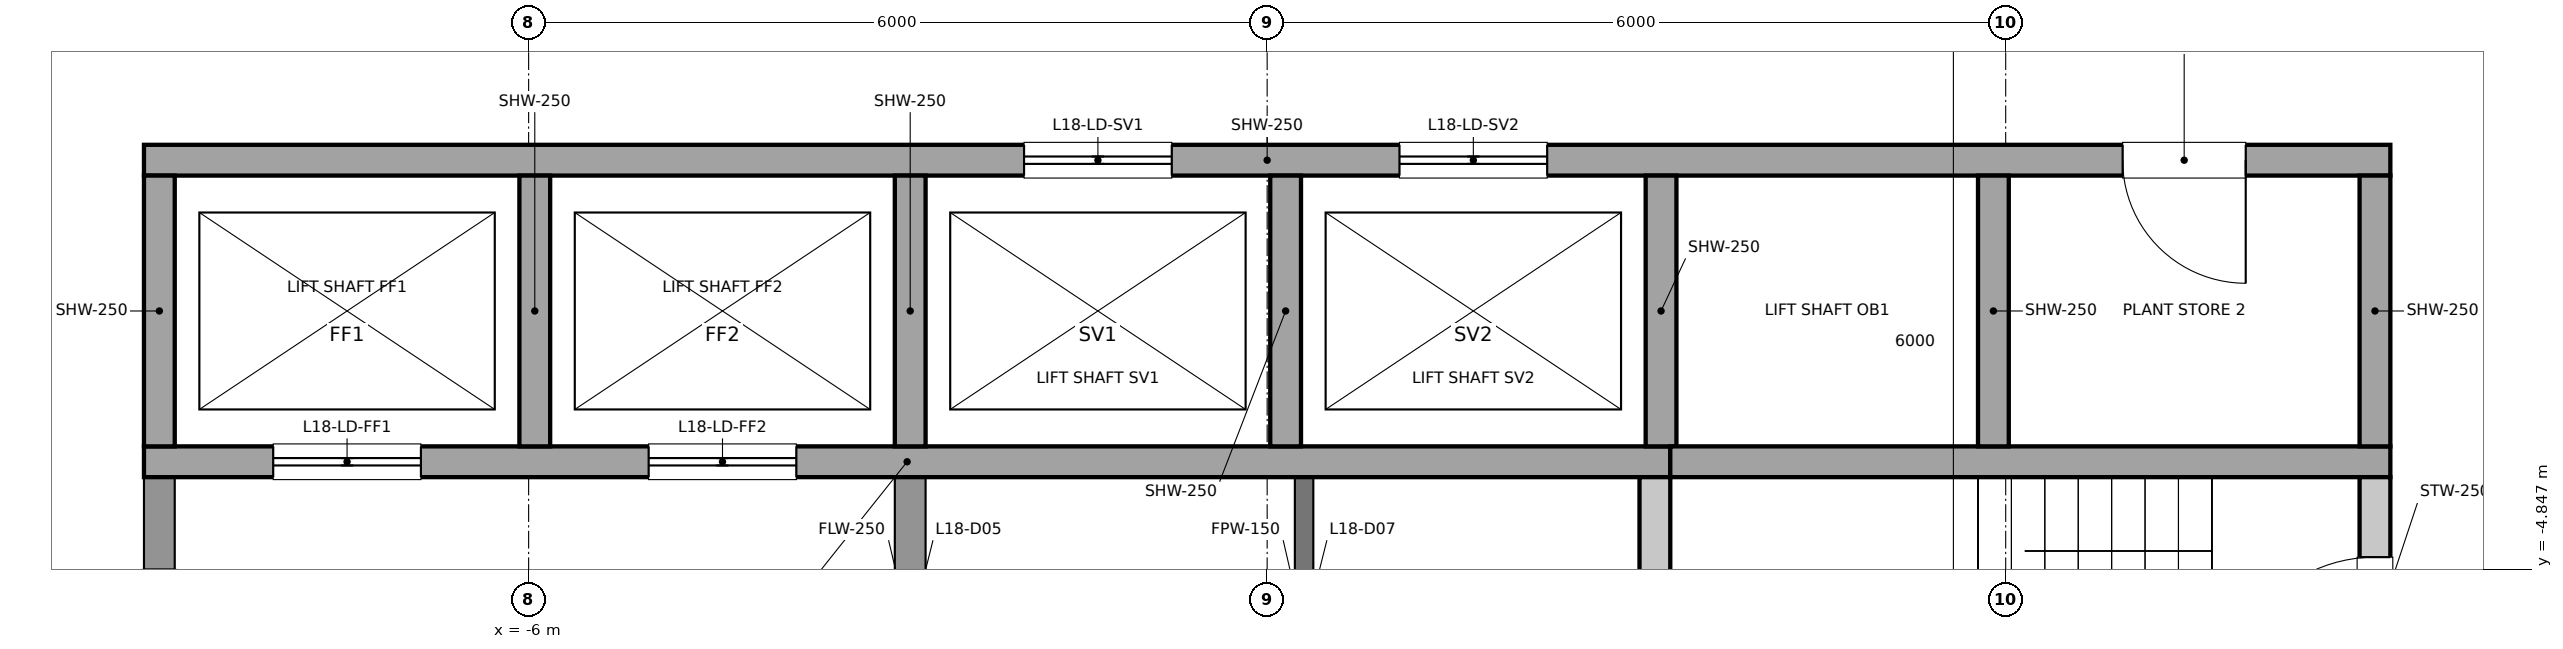
"""IFC4 building model, lengths in metres.
Left out: names, types, materials, properties, quantities, classifications, styles, units other than length and angle.
Written with IfcOpenShell. Run it as: python <this file> out.ifc"""

import sys

from ifc_helpers import new_model, si_unit, direction, frame, frame_2d, origin, place, context, subcontext, project, spatial, rectangle, extrude, element, fill, save


model = new_model("IFC4")
c1 = context("Model", 3, precision=1e-05, world=origin(), true_north=direction((0.0, 1.0)))
c2 = subcontext(c1, "Body", "Model", "MODEL_VIEW")
j1 = project(units=[si_unit("LENGTHUNIT", "METRE"), si_unit("PLANEANGLEUNIT", "RADIAN")], contexts=[c1])
p1 = place(None, origin())
s1 = spatial("IfcSite", under=j1, at=p1, CompositionType="ELEMENT")
p2 = place(p1, origin())
s2 = spatial("IfcBuilding", under=s1, at=p2, CompositionType="ELEMENT")
p3 = place(p2, frame((0.0, 0.0, 96.6)))
s3 = spatial("IfcBuildingStorey", under=s2, at=p3, CompositionType="ELEMENT", Elevation=96.6)
p4 = place(p3, frame((0.3, -6.6, 0.0), z_axis=(0.0, 0.0, 1.0), x_axis=(0.0, 1.0, 0.0)))
e1 = element("IfcWall", 1, at=p4, inside=s3, PredefinedType="PARTITIONING", context=c2, shape_type="SweptSolid", body=[
    extrude(rectangle(XDim=2.5, YDim=0.15, at=frame_2d((1.25, 0.0))), origin(), (0.0, 0.0, 1.0), 5.25),
])
p5 = place(p4, frame((0.8, 0.0, 0.0)))
e2 = element("IfcOpeningElement", 2, at=p5, cuts=e1, PredefinedType="OPENING", context=c2, shape_type="SweptSolid", body=[
    extrude(rectangle(XDim=0.9, YDim=2.1, at=frame_2d((0.45, 1.05))), frame((0.0, 0.075, 0.0), z_axis=(0.0, -1.0, 0.0), x_axis=(1.0, 0.0, 0.0)), (0.0, 0.0, 1.0), 0.15),
])
p6 = place(p3, frame((9.0, -6.6, 0.0), z_axis=(0.0, 0.0, 1.0), x_axis=(0.0, 1.0, 0.0)))
e3 = element("IfcWall", 3, at=p6, inside=s3, PredefinedType="SOLIDWALL", context=c2, shape_type="SweptSolid", body=[
    extrude(rectangle(XDim=2.5, YDim=0.25, at=frame_2d((1.25, 0.0))), origin(), (0.0, 0.0, 1.0), 5.25),
])
p7 = place(p6, frame((0.65, 0.0, 0.0)))
e4 = element("IfcOpeningElement", 4, at=p7, cuts=e3, PredefinedType="OPENING", context=c2, shape_type="SweptSolid", body=[
    extrude(rectangle(XDim=1.2, YDim=2.1, at=frame_2d((0.6, 1.05))), frame((0.0, 0.125, 0.0), z_axis=(0.0, -1.0, 0.0), x_axis=(1.0, 0.0, 0.0)), (0.0, 0.0, 1.0), 0.25),
])
p8 = place(p3, frame((-9.0, -6.6, 0.0), z_axis=(0.0, 0.0, 1.0), x_axis=(0.0, 1.0, 0.0)))
e5 = element("IfcWall", 5, at=p8, inside=s3, PredefinedType="PARTITIONING", context=c2, shape_type="SweptSolid", body=[
    extrude(rectangle(XDim=2.5, YDim=0.25, at=frame_2d((1.25, 0.0))), origin(), (0.0, 0.0, 1.0), 5.25),
])
p9 = place(p8, frame((0.75, 0.0, 0.0)))
e6 = element("IfcOpeningElement", 6, at=p9, cuts=e5, PredefinedType="OPENING", context=c2, shape_type="SweptSolid", body=[
    extrude(rectangle(XDim=1.0, YDim=2.1, at=frame_2d((0.5, 1.05))), frame((0.0, 0.125, 0.0), z_axis=(0.0, -1.0, 0.0), x_axis=(1.0, 0.0, 0.0)), (0.0, 0.0, 1.0), 0.25),
])
p10 = place(p3, frame((3.15, -6.6, 0.0), z_axis=(0.0, 0.0, 1.0), x_axis=(0.0, 1.0, 0.0)))
e7 = element("IfcWall", 7, at=p10, inside=s3, PredefinedType="SOLIDWALL", context=c2, shape_type="SweptSolid", body=[
    extrude(rectangle(XDim=2.5, YDim=0.25, at=frame_2d((1.25, 0.0))), origin(), (0.0, 0.0, 1.0), 5.25),
])
p11 = place(p3, frame((-2.9, -6.6, 0.0), z_axis=(0.0, 0.0, 1.0), x_axis=(0.0, 1.0, 0.0)))
e8 = element("IfcWall", 8, at=p11, inside=s3, PredefinedType="PARTITIONING", context=c2, shape_type="SweptSolid", body=[
    extrude(rectangle(XDim=2.5, YDim=0.25, at=frame_2d((1.25, 0.0))), origin(), (0.0, 0.0, 1.0), 5.25),
])
p12 = place(p11, frame((0.8, 0.0, 0.0)))
e9 = element("IfcOpeningElement", 9, at=p12, cuts=e8, PredefinedType="OPENING", context=c2, shape_type="SweptSolid", body=[
    extrude(rectangle(XDim=0.9, YDim=2.1, at=frame_2d((0.45, 1.05))), frame((0.0, 0.125, 0.0), z_axis=(0.0, -1.0, 0.0), x_axis=(1.0, 0.0, 0.0)), (0.0, 0.0, 1.0), 0.25),
])
p13 = place(p3, frame((-9.125, -1.525, 0.0), z_axis=(0.0, 0.0, 1.0), x_axis=(1.0, 0.0, 0.0)))
e10 = element("IfcWall", 10, at=p13, inside=s3, PredefinedType="SOLIDWALL", context=c2, shape_type="SweptSolid", body=[
    extrude(rectangle(XDim=18.25, YDim=0.25, at=frame_2d((9.125, 0.0))), origin(), (0.0, 0.0, 1.0), 5.25),
])
p14 = place(p13, frame((7.15, 0.0, 0.0)))
e11 = element("IfcOpeningElement", 11, at=p14, cuts=e10, PredefinedType="OPENING", context=c2, shape_type="SweptSolid", body=[
    extrude(rectangle(XDim=1.2, YDim=2.1, at=frame_2d((0.6, 1.05))), frame((0.0, 0.125, 0.0), z_axis=(0.0, -1.0, 0.0), x_axis=(1.0, 0.0, 0.0)), (0.0, 0.0, 1.0), 0.25),
])
p15 = place(p13, frame((10.2, 0.0, 0.0)))
e12 = element("IfcOpeningElement", 12, at=p15, cuts=e10, PredefinedType="OPENING", context=c2, shape_type="SweptSolid", body=[
    extrude(rectangle(XDim=1.2, YDim=2.1, at=frame_2d((0.6, 1.05))), frame((0.0, 0.125, 0.0), z_axis=(0.0, -1.0, 0.0), x_axis=(1.0, 0.0, 0.0)), (0.0, 0.0, 1.0), 0.25),
])
p16 = place(p13, frame((16.075, 0.0, 0.0)))
e13 = element("IfcOpeningElement", 13, at=p16, cuts=e10, PredefinedType="OPENING", context=c2, shape_type="SweptSolid", body=[
    extrude(rectangle(XDim=1.0, YDim=2.1, at=frame_2d((0.5, 1.05))), frame((0.0, 0.125, 0.0), z_axis=(0.0, -1.0, 0.0), x_axis=(1.0, 0.0, 0.0)), (0.0, 0.0, 1.0), 0.25),
])
p17 = place(p3, frame((-9.125, -3.975, 0.0), z_axis=(0.0, 0.0, 1.0), x_axis=(1.0, 0.0, 0.0)))
e14 = element("IfcWall", 14, at=p17, inside=s3, PredefinedType="SOLIDWALL", context=c2, shape_type="SweptSolid", body=[
    extrude(rectangle(XDim=12.4, YDim=0.25, at=frame_2d((6.2, 0.0))), origin(), (0.0, 0.0, 1.0), 5.25),
])
p18 = place(p17, frame((1.05, 0.0, 0.0)))
e15 = element("IfcOpeningElement", 15, at=p18, cuts=e14, PredefinedType="OPENING", context=c2, shape_type="SweptSolid", body=[
    extrude(rectangle(XDim=1.2, YDim=2.1, at=frame_2d((0.6, 1.05))), frame((0.0, 0.125, 0.0), z_axis=(0.0, -1.0, 0.0), x_axis=(1.0, 0.0, 0.0)), (0.0, 0.0, 1.0), 0.25),
])
p19 = place(p17, frame((4.1, 0.0, 0.0)))
e16 = element("IfcOpeningElement", 16, at=p19, cuts=e14, PredefinedType="OPENING", context=c2, shape_type="SweptSolid", body=[
    extrude(rectangle(XDim=1.2, YDim=2.1, at=frame_2d((0.6, 1.05))), frame((0.0, 0.125, 0.0), z_axis=(0.0, -1.0, 0.0), x_axis=(1.0, 0.0, 0.0)), (0.0, 0.0, 1.0), 0.25),
])
p20 = place(p3, frame((3.275, -3.975, 0.0), z_axis=(0.0, 0.0, 1.0), x_axis=(1.0, 0.0, 0.0)))
e17 = element("IfcWall", 17, at=p20, inside=s3, PredefinedType="SOLIDWALL", context=c2, shape_type="SweptSolid", body=[
    extrude(rectangle(XDim=5.85, YDim=0.25, at=frame_2d((2.925, 0.0))), origin(), (0.0, 0.0, 1.0), 5.25),
])
for number, where, z_axis, x_axis in (
    (18, (-9.0, -3.85, 0.0), (0.0, 0.0, 1.0), (0.0, 1.0, 0.0)),
    (19, (-5.95, -3.85, 0.0), (0.0, 0.0, 1.0), (0.0, 1.0, 0.0)),
    (20, (-2.9, -3.85, 0.0), (0.0, 0.0, 1.0), (0.0, 1.0, 0.0)),
    (21, (0.15, -3.85, 0.0), (0.0, 0.0, 1.0), (0.0, 1.0, 0.0)),
    (22, (3.2, -3.85, 0.0), (0.0, 0.0, 1.0), (0.0, 1.0, 0.0)),
    (23, (5.9, -3.85, 0.0), (0.0, 0.0, 1.0), (0.0, 1.0, 0.0)),
    (24, (9.0, -3.85, 0.0), (0.0, 0.0, 1.0), (0.0, 1.0, 0.0)),
):
    element("IfcWall", number, at=place(p3, frame(where, z_axis=z_axis, x_axis=x_axis)), inside=s3, PredefinedType="SOLIDWALL", context=c2, shape_type="SweptSolid", body=[
        extrude(rectangle(XDim=2.2, YDim=0.25, at=frame_2d((1.1, 0.0))), origin(), (0.0, 0.0, 1.0), 5.25),
    ])
p21 = place(p18, origin())
e25 = element("IfcDoor", 25, at=p21, inside=s3, OperationType="DOUBLE_DOOR_SLIDING", PredefinedType="DOOR", context=c2, shape_type="SweptSolid", body=[
    extrude(rectangle(XDim=1.2, YDim=2.1, at=frame_2d((0.6, 1.05))), frame((0.0, 0.025, 0.0), z_axis=(0.0, -1.0, 0.0), x_axis=(1.0, 0.0, 0.0)), (0.0, 0.0, 1.0), 0.05),
])
fill(e15, e25)
p22 = place(p19, origin())
e26 = element("IfcDoor", 26, at=p22, inside=s3, OperationType="DOUBLE_DOOR_SLIDING", PredefinedType="DOOR", context=c2, shape_type="SweptSolid", body=[
    extrude(rectangle(XDim=1.2, YDim=2.1, at=frame_2d((0.6, 1.05))), frame((0.0, 0.025, 0.0), z_axis=(0.0, -1.0, 0.0), x_axis=(1.0, 0.0, 0.0)), (0.0, 0.0, 1.0), 0.05),
])
fill(e16, e26)
p23 = place(p14, origin())
e27 = element("IfcDoor", 27, at=p23, inside=s3, OperationType="DOUBLE_DOOR_SLIDING", PredefinedType="DOOR", context=c2, shape_type="SweptSolid", body=[
    extrude(rectangle(XDim=1.2, YDim=2.1, at=frame_2d((0.6, 1.05))), frame((0.0, 0.025, 0.0), z_axis=(0.0, -1.0, 0.0), x_axis=(1.0, 0.0, 0.0)), (0.0, 0.0, 1.0), 0.05),
])
fill(e11, e27)
p24 = place(p15, origin())
e28 = element("IfcDoor", 28, at=p24, inside=s3, OperationType="DOUBLE_DOOR_SLIDING", PredefinedType="DOOR", context=c2, shape_type="SweptSolid", body=[
    extrude(rectangle(XDim=1.2, YDim=2.1, at=frame_2d((0.6, 1.05))), frame((0.0, 0.025, 0.0), z_axis=(0.0, -1.0, 0.0), x_axis=(1.0, 0.0, 0.0)), (0.0, 0.0, 1.0), 0.05),
])
fill(e12, e28)
p25 = place(p7, origin())
e29 = element("IfcDoor", 29, at=p25, inside=s3, OperationType="SINGLE_SWING_LEFT", PredefinedType="DOOR", context=c2, shape_type="SweptSolid", body=[
    extrude(rectangle(XDim=1.2, YDim=2.1, at=frame_2d((0.6, 1.05))), frame((0.0, 0.025, 0.0), z_axis=(0.0, -1.0, 0.0), x_axis=(1.0, 0.0, 0.0)), (0.0, 0.0, 1.0), 0.05),
])
fill(e4, e29)
p26 = place(p16, origin())
e30 = element("IfcDoor", 30, at=p26, inside=s3, OperationType="SINGLE_SWING_RIGHT", PredefinedType="DOOR", context=c2, shape_type="SweptSolid", body=[
    extrude(rectangle(XDim=1.0, YDim=2.1, at=frame_2d((0.5, 1.05))), frame((0.0, 0.025, 0.0), z_axis=(0.0, -1.0, 0.0), x_axis=(1.0, 0.0, 0.0)), (0.0, 0.0, 1.0), 0.05),
])
fill(e13, e30)
save(model, sys.argv[1])
